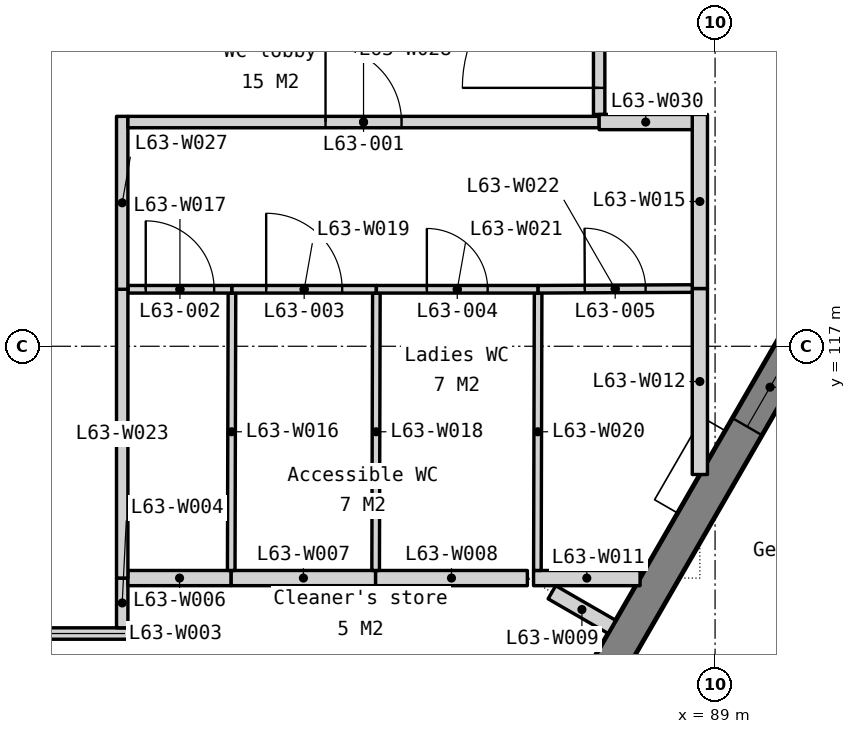
"""IFC4 building model, lengths in metres.
Left out: names, types, materials, properties, quantities, classifications, styles, units other than length and angle.
Written with IfcOpenShell. Run it as: python <this file> out.ifc"""

import sys

from ifc_helpers import new_model, si_unit, direction, frame, frame_2d, origin, place, context, subcontext, project, spatial, polyline, rectangle, outline, extrude, element, fill, save


model = new_model("IFC4")
c1 = context("Model", 3, precision=1e-05, world=origin(), true_north=direction((0.0, 1.0)))
c2 = subcontext(c1, "Body", "Model", "MODEL_VIEW")
j1 = project(units=[si_unit("LENGTHUNIT", "METRE"), si_unit("PLANEANGLEUNIT", "RADIAN")], contexts=[c1])
p1 = place(None, origin())
s1 = spatial("IfcSite", under=j1, at=p1, CompositionType="ELEMENT")
p2 = place(p1, origin())
s2 = spatial("IfcBuilding", under=s1, at=p2, CompositionType="ELEMENT")
p3 = place(p2, frame((0.0, 0.0, 258.2)))
s3 = spatial("IfcBuildingStorey", under=s2, at=p3, CompositionType="ELEMENT", Elevation=258.2)
p4 = place(p3, frame((80.905, 101.188, -0.15), z_axis=(0.0, 0.0, 1.0), x_axis=(0.500002536638, 0.866023939251, 0.0)))
e1 = element("IfcWall", 1, at=p4, inside=s3, PredefinedType="SOLIDWALL", context=c2, shape_type="SweptSolid", body=[
    extrude(outline(polyline([(36.972, 0.0), (36.972, 3.9), (0.0, 3.9), (0.0, 0.0), (36.972, 0.0)])), frame((0.0, 0.225, 0.0), z_axis=(0.0, -1.0, 0.0), x_axis=(1.0, 0.0, 0.0)), (0.0, 0.0, 1.0), 0.45),
])
p5 = place(p4, frame((0.715, 0.0, 0.95)))
e2 = element("IfcOpeningElement", 2, at=p5, cuts=e1, PredefinedType="OPENING", context=c2, shape_type="SweptSolid", body=[
    extrude(rectangle(XDim=1.2, YDim=2.2, at=frame_2d((0.6, 1.1))), frame((0.0, 0.235, 0.0), z_axis=(0.0, -1.0, 0.0), x_axis=(1.0, 0.0, 0.0)), (0.0, 0.0, 1.0), 0.47),
])
p6 = place(p4, frame((7.793, 0.0, 0.95)))
e3 = element("IfcOpeningElement", 3, at=p6, cuts=e1, PredefinedType="OPENING", context=c2, shape_type="SweptSolid", body=[
    extrude(rectangle(XDim=1.2, YDim=2.2, at=frame_2d((0.6, 1.1))), frame((0.0, 0.235, 0.0), z_axis=(0.0, -1.0, 0.0), x_axis=(1.0, 0.0, 0.0)), (0.0, 0.0, 1.0), 0.47),
])
p7 = place(p4, frame((9.493, 0.0, 0.95)))
e4 = element("IfcOpeningElement", 4, at=p7, cuts=e1, PredefinedType="OPENING", context=c2, shape_type="SweptSolid", body=[
    extrude(rectangle(XDim=1.2, YDim=2.2, at=frame_2d((0.6, 1.1))), frame((0.0, 0.235, 0.0), z_axis=(0.0, -1.0, 0.0), x_axis=(1.0, 0.0, 0.0)), (0.0, 0.0, 1.0), 0.47),
])
p8 = place(p4, frame((17.036, 0.0, 0.95)))
e5 = element("IfcOpeningElement", 5, at=p8, cuts=e1, PredefinedType="OPENING", context=c2, shape_type="SweptSolid", body=[
    extrude(rectangle(XDim=1.2, YDim=2.2, at=frame_2d((0.6, 1.1))), frame((0.0, 0.235, 0.0), z_axis=(0.0, -1.0, 0.0), x_axis=(1.0, 0.0, 0.0)), (0.0, 0.0, 1.0), 0.47),
])
p9 = place(p4, frame((18.736, 0.0, 0.95)))
e6 = element("IfcOpeningElement", 6, at=p9, cuts=e1, PredefinedType="OPENING", context=c2, shape_type="SweptSolid", body=[
    extrude(rectangle(XDim=1.2, YDim=2.2, at=frame_2d((0.6, 1.1))), frame((0.0, 0.235, 0.0), z_axis=(0.0, -1.0, 0.0), x_axis=(1.0, 0.0, 0.0)), (0.0, 0.0, 1.0), 0.47),
])
p10 = place(p4, frame((26.279, 0.0, 0.95)))
e7 = element("IfcOpeningElement", 7, at=p10, cuts=e1, PredefinedType="OPENING", context=c2, shape_type="SweptSolid", body=[
    extrude(rectangle(XDim=1.2, YDim=2.2, at=frame_2d((0.6, 1.1))), frame((0.0, 0.235, 0.0), z_axis=(0.0, -1.0, 0.0), x_axis=(1.0, 0.0, 0.0)), (0.0, 0.0, 1.0), 0.47),
])
p11 = place(p4, frame((27.979, 0.0, 0.95)))
e8 = element("IfcOpeningElement", 8, at=p11, cuts=e1, PredefinedType="OPENING", context=c2, shape_type="SweptSolid", body=[
    extrude(rectangle(XDim=1.2, YDim=2.2, at=frame_2d((0.6, 1.1))), frame((0.0, 0.235, 0.0), z_axis=(0.0, -1.0, 0.0), x_axis=(1.0, 0.0, 0.0)), (0.0, 0.0, 1.0), 0.47),
])
p12 = place(p4, frame((35.058, 0.0, 0.95)))
e9 = element("IfcOpeningElement", 9, at=p12, cuts=e1, PredefinedType="OPENING", context=c2, shape_type="SweptSolid", body=[
    extrude(rectangle(XDim=1.2, YDim=2.2, at=frame_2d((0.6, 1.1))), frame((0.0, 0.235, 0.0), z_axis=(0.0, -1.0, 0.0), x_axis=(1.0, 0.0, 0.0)), (0.0, 0.0, 1.0), 0.47),
])
p13 = place(p3, frame((78.725, 113.22, 0.0), z_axis=(0.0, 0.0, 1.0), x_axis=(1.0, 0.0, 0.0)))
e10 = element("IfcWall", 10, at=p13, inside=s3, PredefinedType="PARTITIONING", context=c2, shape_type="SweptSolid", body=[
    extrude(rectangle(XDim=2.55, YDim=0.15, at=frame_2d((1.275, 0.0))), origin(), (0.0, 0.0, 1.0), 3.28),
])
p14 = place(p3, frame((81.2, 113.295, 0.0), z_axis=(0.0, 0.0, 1.0), x_axis=(0.0, 1.0, 0.0)))
e11 = element("IfcWall", 11, at=p14, inside=s3, PredefinedType="PARTITIONING", context=c2, shape_type="SweptSolid", body=[
    extrude(rectangle(XDim=0.655, YDim=0.15, at=frame_2d((0.327, 0.0))), origin(), (0.0, 0.0, 1.0), 3.75),
])
p15 = place(p3, frame((81.275, 113.95, 0.0), z_axis=(0.0, 0.0, 1.0), x_axis=(1.0, 0.0, 0.0)))
e12 = element("IfcWall", 12, at=p15, inside=s3, PredefinedType="PARTITIONING", context=c2, shape_type="SweptSolid", body=[
    extrude(rectangle(XDim=1.359, YDim=0.2, at=frame_2d((0.68, 0.0))), origin(), (0.0, 0.0, 1.0), 3.75),
])
p16 = place(p3, frame((82.634, 113.95, 0.0), z_axis=(0.0, 0.0, 1.0), x_axis=(1.0, 0.0, 0.0)))
e13 = element("IfcWall", 13, at=p16, inside=s3, PredefinedType="PARTITIONING", context=c2, shape_type="SweptSolid", body=[
    extrude(rectangle(XDim=1.9, YDim=0.2, at=frame_2d((0.95, 0.0))), origin(), (0.0, 0.0, 1.0), 3.75),
])
p17 = place(p3, frame((84.534, 113.95, 0.0), z_axis=(0.0, 0.0, 1.0), x_axis=(1.0, 0.0, 0.0)))
e14 = element("IfcWall", 14, at=p17, inside=s3, PredefinedType="PARTITIONING", context=c2, shape_type="SweptSolid", body=[
    extrude(rectangle(XDim=1.997, YDim=0.2, at=frame_2d((0.998, 0.0))), origin(), (0.0, 0.0, 1.0), 3.75),
])
p18 = place(p3, frame((86.854, 113.763, 0.0), z_axis=(0.0, 0.0, 1.0), x_axis=(0.865957935948, -0.500116839517, 0.0)))
e15 = element("IfcWall", 15, at=p18, inside=s3, PredefinedType="PARTITIONING", context=c2, shape_type="SweptSolid", body=[
    extrude(rectangle(XDim=0.911, YDim=0.2, at=frame_2d((0.456, 0.0))), origin(), (0.0, 0.0, 1.0), 3.75),
])
p19 = place(p3, frame((86.612, 113.95, 0.0), z_axis=(0.0, 0.0, 1.0), x_axis=(1.0, 0.0, 0.0)))
e16 = element("IfcWall", 16, at=p19, inside=s3, PredefinedType="PARTITIONING", context=c2, shape_type="SweptSolid", body=[
    extrude(rectangle(XDim=1.401, YDim=0.2, at=frame_2d((0.701, 0.0))), origin(), (0.0, 0.0, 1.0), 3.75),
])
p20 = place(p3, frame((88.8, 115.312, 0.0), z_axis=(0.0, 0.0, 1.0), x_axis=(0.0, 1.0, 0.0)))
e17 = element("IfcWall", 17, at=p20, inside=s3, PredefinedType="PARTITIONING", context=c2, shape_type="SweptSolid", body=[
    extrude(rectangle(XDim=2.448, YDim=0.2, at=frame_2d((1.224, 0.0))), origin(), (0.0, 0.0, 1.0), 3.062),
])
p21 = place(p3, frame((88.8, 117.76, 0.0), z_axis=(0.0, 0.0, 1.0), x_axis=(0.0, 1.0, 0.0)))
e18 = element("IfcWall", 18, at=p21, inside=s3, PredefinedType="PARTITIONING", context=c2, shape_type="SweptSolid", body=[
    extrude(rectangle(XDim=2.29, YDim=0.2, at=frame_2d((1.145, 0.0))), origin(), (0.0, 0.0, 1.0), 3.062),
])
p22 = place(p3, frame((82.634, 114.05, 0.0), z_axis=(0.0, 0.0, 1.0), x_axis=(0.002608686776, 0.999996597371, 0.0)))
e19 = element("IfcWall", 19, at=p22, inside=s3, PredefinedType="PARTITIONING", context=c2, shape_type="SweptSolid", body=[
    extrude(rectangle(XDim=3.65, YDim=0.1, at=frame_2d((1.825, 0.0))), origin(), (0.0, 0.0, 1.0), 3.75),
])
p23 = place(p3, frame((81.275, 117.75, 0.0), z_axis=(0.0, 0.0, 1.0), x_axis=(1.0, 0.0, 0.0)))
e20 = element("IfcWall", 20, at=p23, inside=s3, PredefinedType="PARTITIONING", context=c2, shape_type="SweptSolid", body=[
    extrude(rectangle(XDim=1.369, YDim=0.1, at=frame_2d((0.685, 0.0))), origin(), (0.0, 0.0, 1.0), 3.75),
])
p24 = place(p23, frame((0.235, 0.0, 0.0)))
e21 = element("IfcOpeningElement", 21, at=p24, cuts=e20, PredefinedType="OPENING", context=c2, shape_type="SweptSolid", body=[
    extrude(rectangle(XDim=0.9, YDim=2.1, at=frame_2d((0.45, 1.05))), frame((0.0, 0.06, 0.0), z_axis=(0.0, -1.0, 0.0), x_axis=(1.0, 0.0, 0.0)), (0.0, 0.0, 1.0), 0.12),
])
p25 = place(p3, frame((84.534, 114.05, 0.0), z_axis=(0.0, 0.0, 1.0), x_axis=(0.002675575707, 0.999996420641, 0.0)))
e22 = element("IfcWall", 22, at=p25, inside=s3, PredefinedType="PARTITIONING", context=c2, shape_type="SweptSolid", body=[
    extrude(rectangle(XDim=3.65, YDim=0.1, at=frame_2d((1.825, 0.0))), origin(), (0.0, 0.0, 1.0), 3.75),
])
p26 = place(p3, frame((82.644, 117.75, 0.0), z_axis=(0.0, 0.0, 1.0), x_axis=(1.0, 0.0, 0.0)))
e23 = element("IfcWall", 23, at=p26, inside=s3, PredefinedType="PARTITIONING", context=c2, shape_type="SweptSolid", body=[
    extrude(rectangle(XDim=1.9, YDim=0.1, at=frame_2d((0.95, 0.0))), origin(), (0.0, 0.0, 1.0), 3.75),
])
p27 = place(p26, frame((0.45, 0.0, 0.0)))
e24 = element("IfcOpeningElement", 24, at=p27, cuts=e23, PredefinedType="OPENING", context=c2, shape_type="SweptSolid", body=[
    extrude(rectangle(XDim=1.0, YDim=2.1, at=frame_2d((0.5, 1.05))), frame((0.0, 0.06, 0.0), z_axis=(0.0, -1.0, 0.0), x_axis=(1.0, 0.0, 0.0)), (0.0, 0.0, 1.0), 0.12),
])
p28 = place(p3, frame((86.662, 114.05, 0.0), z_axis=(0.0, 0.0, 1.0), x_axis=(0.002608686776, 0.999996597371, 0.0)))
e25 = element("IfcWall", 25, at=p28, inside=s3, PredefinedType="PARTITIONING", context=c2, shape_type="SweptSolid", body=[
    extrude(rectangle(XDim=3.65, YDim=0.1, at=frame_2d((1.825, 0.0))), origin(), (0.0, 0.0, 1.0), 3.75),
])
p29 = place(p3, frame((84.544, 117.75, 0.0), z_axis=(0.0, 0.0, 1.0), x_axis=(1.0, 0.0, 0.0)))
e26 = element("IfcWall", 26, at=p29, inside=s3, PredefinedType="PARTITIONING", context=c2, shape_type="SweptSolid", body=[
    extrude(rectangle(XDim=2.128, YDim=0.1, at=frame_2d((1.064, 0.0))), origin(), (0.0, 0.0, 1.0), 3.75),
])
p30 = place(p29, frame((0.664, 0.0, 0.0)))
e27 = element("IfcOpeningElement", 27, at=p30, cuts=e26, PredefinedType="OPENING", context=c2, shape_type="SweptSolid", body=[
    extrude(rectangle(XDim=0.8, YDim=2.1, at=frame_2d((0.4, 1.05))), frame((0.0, 0.06, 0.0), z_axis=(0.0, -1.0, 0.0), x_axis=(1.0, 0.0, 0.0)), (0.0, 0.0, 1.0), 0.12),
])
p31 = place(p3, frame((86.672, 117.75, 0.0), z_axis=(0.0, 0.0, 1.0), x_axis=(0.999988976787, 0.004695349157, 0.0)))
e28 = element("IfcWall", 28, at=p31, inside=s3, PredefinedType="PARTITIONING", context=c2, shape_type="SweptSolid", body=[
    extrude(rectangle(XDim=2.028, YDim=0.1, at=frame_2d((1.014, 0.0))), origin(), (0.0, 0.0, 1.0), 3.75),
])
p32 = place(p31, frame((0.614, 0.0, 0.0)))
e29 = element("IfcOpeningElement", 29, at=p32, cuts=e28, PredefinedType="OPENING", context=c2, shape_type="SweptSolid", body=[
    extrude(rectangle(XDim=0.8, YDim=2.1, at=frame_2d((0.4, 1.05))), frame((0.0, 0.06, 0.0), z_axis=(0.0, -1.0, 0.0), x_axis=(1.0, 0.0, 0.0)), (0.0, 0.0, 1.0), 0.12),
])
p33 = place(p3, frame((81.2, 113.95, 0.0), z_axis=(0.0, 0.0, 1.0), x_axis=(0.0, 1.0, 0.0)))
e30 = element("IfcWall", 30, at=p33, inside=s3, PredefinedType="PARTITIONING", context=c2, shape_type="SweptSolid", body=[
    extrude(rectangle(XDim=3.8, YDim=0.15, at=frame_2d((1.9, 0.0))), origin(), (0.0, 0.0, 1.0), 3.75),
])
p34 = place(p3, frame((81.2, 117.75, 0.0), z_axis=(0.0, 0.0, 1.0), x_axis=(0.0, 1.0, 0.0)))
e31 = element("IfcWall", 31, at=p34, inside=s3, PredefinedType="PARTITIONING", context=c2, shape_type="SweptSolid", body=[
    extrude(rectangle(XDim=2.275, YDim=0.15, at=frame_2d((1.137, 0.0))), origin(), (0.0, 0.0, 1.0), 3.75),
])
p35 = place(p3, frame((81.275, 119.95, 0.0), z_axis=(0.0, 0.0, 1.0), x_axis=(1.0, 0.0, 0.0)))
e32 = element("IfcWall", 32, at=p35, inside=s3, PredefinedType="PARTITIONING", context=c2, shape_type="SweptSolid", body=[
    extrude(rectangle(XDim=6.2, YDim=0.15, at=frame_2d((3.1, 0.0))), origin(), (0.0, 0.0, 1.0), 3.75),
])
p36 = place(p35, frame((2.6, 0.0, 0.0)))
e33 = element("IfcOpeningElement", 33, at=p36, cuts=e32, PredefinedType="OPENING", context=c2, shape_type="SweptSolid", body=[
    extrude(rectangle(XDim=1.0, YDim=2.1, at=frame_2d((0.5, 1.05))), frame((0.0, 0.085, 0.0), z_axis=(0.0, -1.0, 0.0), x_axis=(1.0, 0.0, 0.0)), (0.0, 0.0, 1.0), 0.17),
])
p37 = place(p3, frame((87.475, 120.05, 0.0), z_axis=(0.0, 0.0, 1.0), x_axis=(0.0, 1.0, 0.0)))
e34 = element("IfcWall", 34, at=p37, inside=s3, PredefinedType="PARTITIONING", context=c2, shape_type="SweptSolid", body=[
    extrude(rectangle(XDim=2.5, YDim=0.15, at=frame_2d((1.25, 0.0))), origin(), (0.0, 0.0, 1.0), 3.75),
])
p38 = place(p37, frame((0.35, 0.0, 0.0)))
e35 = element("IfcOpeningElement", 35, at=p38, cuts=e34, PredefinedType="OPENING", context=c2, shape_type="SweptSolid", body=[
    extrude(rectangle(XDim=1.8, YDim=2.1, at=frame_2d((0.9, 1.05))), frame((0.0, 0.085, 0.0), z_axis=(0.0, -1.0, 0.0), x_axis=(1.0, 0.0, 0.0)), (0.0, 0.0, 1.0), 0.17),
])
p39 = place(p3, frame((87.475, 119.95, 0.0), z_axis=(0.0, 0.0, 1.0), x_axis=(1.0, 0.0, 0.0)))
e36 = element("IfcWall", 36, at=p39, inside=s3, PredefinedType="PARTITIONING", context=c2, shape_type="SweptSolid", body=[
    extrude(rectangle(XDim=1.225, YDim=0.2, at=frame_2d((0.612, 0.0))), origin(), (0.0, 0.0, 1.0), 3.75),
])
p40 = place(p8, origin())
e37 = element("IfcWindow", 37, at=p40, inside=s3, PartitioningType="SINGLE_PANEL", PredefinedType="WINDOW", context=c2, shape_type="SweptSolid", body=[
    extrude(rectangle(XDim=1.2, YDim=2.2, at=frame_2d((0.6, 1.1))), frame((0.0, 0.03, 0.0), z_axis=(0.0, -1.0, 0.0), x_axis=(1.0, 0.0, 0.0)), (0.0, 0.0, 1.0), 0.06),
])
fill(e5, e37)
p41 = place(p36, origin())
e38 = element("IfcDoor", 38, at=p41, inside=s3, OperationType="SINGLE_SWING_LEFT", PredefinedType="DOOR", context=c2, shape_type="SweptSolid", body=[
    extrude(rectangle(XDim=1.0, YDim=2.1, at=frame_2d((0.5, 1.05))), frame((0.0, 0.025, 0.0), z_axis=(0.0, -1.0, 0.0), x_axis=(1.0, 0.0, 0.0)), (0.0, 0.0, 1.0), 0.05),
])
fill(e33, e38)
p42 = place(p24, origin())
e39 = element("IfcDoor", 39, at=p42, inside=s3, OperationType="SINGLE_SWING_LEFT", PredefinedType="DOOR", context=c2, shape_type="SweptSolid", body=[
    extrude(rectangle(XDim=0.9, YDim=2.1, at=frame_2d((0.45, 1.05))), frame((0.0, 0.025, 0.0), z_axis=(0.0, -1.0, 0.0), x_axis=(1.0, 0.0, 0.0)), (0.0, 0.0, 1.0), 0.05),
])
fill(e21, e39)
p43 = place(p27, origin())
e40 = element("IfcDoor", 40, at=p43, inside=s3, OperationType="SINGLE_SWING_LEFT", PredefinedType="DOOR", context=c2, shape_type="SweptSolid", body=[
    extrude(rectangle(XDim=1.0, YDim=2.1, at=frame_2d((0.5, 1.05))), frame((0.0, 0.025, 0.0), z_axis=(0.0, -1.0, 0.0), x_axis=(1.0, 0.0, 0.0)), (0.0, 0.0, 1.0), 0.05),
])
fill(e24, e40)
p44 = place(p30, origin())
e41 = element("IfcDoor", 41, at=p44, inside=s3, OperationType="SINGLE_SWING_LEFT", PredefinedType="DOOR", context=c2, shape_type="SweptSolid", body=[
    extrude(rectangle(XDim=0.8, YDim=2.1, at=frame_2d((0.4, 1.05))), frame((0.0, 0.025, 0.0), z_axis=(0.0, -1.0, 0.0), x_axis=(1.0, 0.0, 0.0)), (0.0, 0.0, 1.0), 0.05),
])
fill(e27, e41)
p45 = place(p32, origin())
e42 = element("IfcDoor", 42, at=p45, inside=s3, OperationType="SINGLE_SWING_LEFT", PredefinedType="DOOR", context=c2, shape_type="SweptSolid", body=[
    extrude(rectangle(XDim=0.8, YDim=2.1, at=frame_2d((0.4, 1.05))), frame((0.0, 0.025, 0.0), z_axis=(0.0, -1.0, 0.0), x_axis=(1.0, 0.0, 0.0)), (0.0, 0.0, 1.0), 0.05),
])
fill(e29, e42)
p46 = place(p38, origin())
e43 = element("IfcDoor", 43, at=p46, inside=s3, OperationType="SINGLE_SWING_LEFT", PredefinedType="DOOR", context=c2, shape_type="SweptSolid", body=[
    extrude(rectangle(XDim=1.8, YDim=2.1, at=frame_2d((0.9, 1.05))), frame((0.0, 0.025, 0.0), z_axis=(0.0, -1.0, 0.0), x_axis=(1.0, 0.0, 0.0)), (0.0, 0.0, 1.0), 0.05),
])
fill(e35, e43)
save(model, sys.argv[1])
